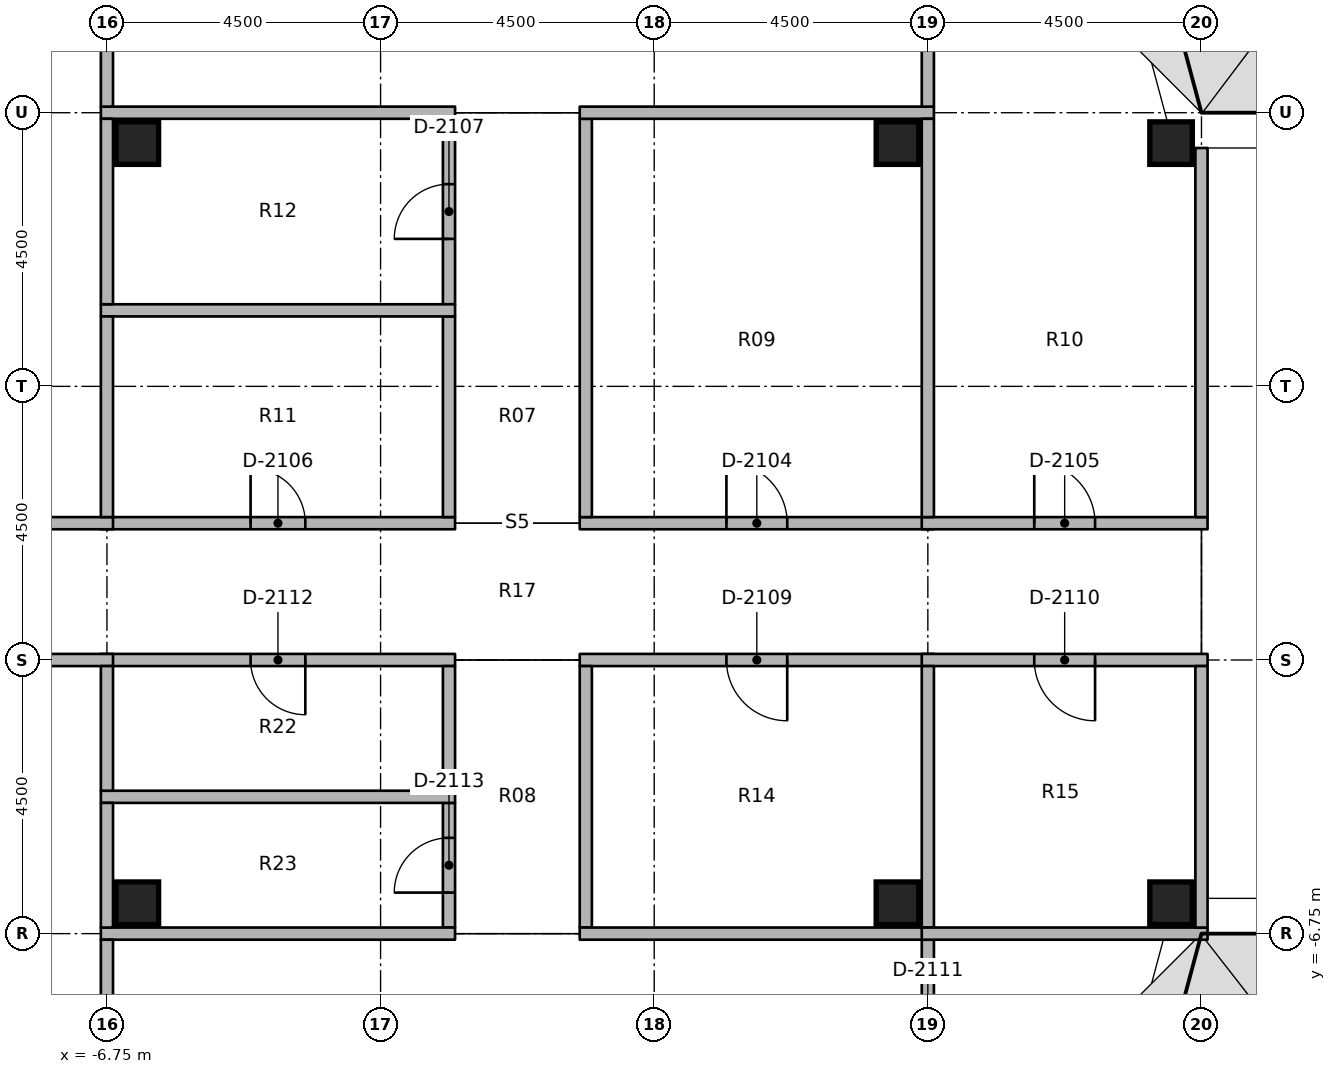
"""IFC4 building model, lengths in metres.
Left out: names, types, materials, properties, quantities, classifications, styles, units other than length and angle.
Written with IfcOpenShell. Run it as: python <this file> out.ifc"""

import sys

from ifc_helpers import new_model, si_unit, direction, frame, frame_2d, origin, origin_2d, place, context, subcontext, project, spatial, rectangle, extrude, element, fill, save


model = new_model("IFC4")
c1 = context("Model", 3, precision=1e-05, world=origin(), true_north=direction((0.0, 1.0)))
c2 = subcontext(c1, "Body", "Model", "MODEL_VIEW")
j1 = project(units=[si_unit("LENGTHUNIT", "METRE"), si_unit("PLANEANGLEUNIT", "RADIAN")], contexts=[c1])
p1 = place(None, origin())
s1 = spatial("IfcSite", under=j1, at=p1, CompositionType="ELEMENT")
p2 = place(p1, origin())
s2 = spatial("IfcBuilding", under=s1, at=p2, CompositionType="ELEMENT")
p3 = place(p2, frame((0.0, 0.0, 195.4)))
s3 = spatial("IfcBuildingStorey", under=s2, at=p3, CompositionType="ELEMENT", Elevation=195.4)
for number, where, z_axis, x_axis in (
    (1, (-6.25, -6.25, 0.0), (0.0, 0.0, 1.0), (1.0, 0.0, 0.0)),
    (2, (-6.25, 6.25, 0.0), (0.0, 0.0, 1.0), (1.0, 0.0, 0.0)),
    (3, (6.25, -6.25, 0.0), (0.0, 0.0, 1.0), (1.0, 0.0, 0.0)),
    (4, (6.25, 6.25, 0.0), (0.0, 0.0, 1.0), (1.0, 0.0, 0.0)),
    (5, (10.75, -6.25, 0.0), (0.0, 0.0, 1.0), (1.0, 0.0, 0.0)),
    (6, (10.75, 6.25, 0.0), (0.0, 0.0, 1.0), (1.0, 0.0, 0.0)),
):
    element("IfcColumn", number, at=place(p3, frame(where, z_axis=z_axis, x_axis=x_axis)), inside=s3, PredefinedType="COLUMN", context=c2, shape_type="SweptSolid", body=[
        extrude(rectangle(XDim=0.7, YDim=0.7, at=origin_2d()), origin(), (0.0, 0.0, 1.0), 3.65),
    ])
p4 = place(p3, frame((1.025, 0.0, 0.0), z_axis=(0.0, 0.0, 1.0), x_axis=(1.0, 0.0, 0.0)))
e7 = element("IfcWall", 7, at=p4, inside=s3, PredefinedType="PARTITIONING", context=c2, shape_type="SweptSolid", body=[
    extrude(rectangle(XDim=5.825, YDim=0.2, at=frame_2d((2.913, 0.0))), origin(), (0.0, 0.0, 1.0), 2.75),
])
p5 = place(p4, frame((2.413, 0.0, 0.0)))
e8 = element("IfcOpeningElement", 8, at=p5, cuts=e7, PredefinedType="OPENING", context=c2, shape_type="SweptSolid", body=[
    extrude(rectangle(XDim=1.0, YDim=2.1, at=frame_2d((0.5, 1.05))), frame((0.0, 0.11, 0.0), z_axis=(0.0, -1.0, 0.0), x_axis=(1.0, 0.0, 0.0)), (0.0, 0.0, 1.0), 0.22),
])
p6 = place(p3, frame((6.65, 0.0, 0.0), z_axis=(0.0, 0.0, 1.0), x_axis=(1.0, 0.0, 0.0)))
e9 = element("IfcWall", 9, at=p6, inside=s3, PredefinedType="PARTITIONING", context=c2, shape_type="SweptSolid", body=[
    extrude(rectangle(XDim=4.7, YDim=0.2, at=frame_2d((2.35, 0.0))), origin(), (0.0, 0.0, 1.0), 2.75),
])
p7 = place(p6, frame((1.85, 0.0, 0.0)))
e10 = element("IfcOpeningElement", 10, at=p7, cuts=e9, PredefinedType="OPENING", context=c2, shape_type="SweptSolid", body=[
    extrude(rectangle(XDim=1.0, YDim=2.1, at=frame_2d((0.5, 1.05))), frame((0.0, 0.11, 0.0), z_axis=(0.0, -1.0, 0.0), x_axis=(1.0, 0.0, 0.0)), (0.0, 0.0, 1.0), 0.22),
])
p8 = place(p3, frame((-6.85, 0.0, 0.0), z_axis=(0.0, 0.0, 1.0), x_axis=(1.0, 0.0, 0.0)))
e11 = element("IfcWall", 11, at=p8, inside=s3, PredefinedType="PARTITIONING", context=c2, shape_type="SweptSolid", body=[
    extrude(rectangle(XDim=5.825, YDim=0.2, at=frame_2d((2.913, 0.0))), origin(), (0.0, 0.0, 1.0), 2.75),
])
p9 = place(p8, frame((2.462, 0.0, 0.0)))
e12 = element("IfcOpeningElement", 12, at=p9, cuts=e11, PredefinedType="OPENING", context=c2, shape_type="SweptSolid", body=[
    extrude(rectangle(XDim=0.9, YDim=2.1, at=frame_2d((0.45, 1.05))), frame((0.0, 0.11, 0.0), z_axis=(0.0, -1.0, 0.0), x_axis=(1.0, 0.0, 0.0)), (0.0, 0.0, 1.0), 0.22),
])
p10 = place(p3, frame((-11.35, 0.0, 0.0), z_axis=(0.0, 0.0, 1.0), x_axis=(1.0, 0.0, 0.0)))
e13 = element("IfcWall", 13, at=p10, inside=s3, PredefinedType="PARTITIONING", context=c2, shape_type="SweptSolid", body=[
    extrude(rectangle(XDim=4.7, YDim=0.2, at=frame_2d((2.35, 0.0))), origin(), (0.0, 0.0, 1.0), 2.75),
])
p11 = place(p10, frame((1.85, 0.0, 0.0)))
e14 = element("IfcOpeningElement", 14, at=p11, cuts=e13, PredefinedType="OPENING", context=c2, shape_type="SweptSolid", body=[
    extrude(rectangle(XDim=1.0, YDim=2.1, at=frame_2d((0.5, 1.05))), frame((0.0, 0.11, 0.0), z_axis=(0.0, -1.0, 0.0), x_axis=(1.0, 0.0, 0.0)), (0.0, 0.0, 1.0), 0.22),
])
p12 = place(p3, frame((6.85, -2.25, 0.0), z_axis=(0.0, 0.0, 1.0), x_axis=(-1.0, 0.0, 0.0)))
e15 = element("IfcWall", 15, at=p12, inside=s3, PredefinedType="PARTITIONING", context=c2, shape_type="SweptSolid", body=[
    extrude(rectangle(XDim=5.825, YDim=0.2, at=frame_2d((2.913, 0.0))), origin(), (0.0, 0.0, 1.0), 2.75),
])
p13 = place(p12, frame((2.413, 0.0, 0.0)))
e16 = element("IfcOpeningElement", 16, at=p13, cuts=e15, PredefinedType="OPENING", context=c2, shape_type="SweptSolid", body=[
    extrude(rectangle(XDim=1.0, YDim=2.1, at=frame_2d((0.5, 1.05))), frame((0.0, 0.11, 0.0), z_axis=(0.0, -1.0, 0.0), x_axis=(1.0, 0.0, 0.0)), (0.0, 0.0, 1.0), 0.22),
])
p14 = place(p3, frame((11.35, -2.25, 0.0), z_axis=(0.0, 0.0, 1.0), x_axis=(-1.0, 0.0, 0.0)))
e17 = element("IfcWall", 17, at=p14, inside=s3, PredefinedType="PARTITIONING", context=c2, shape_type="SweptSolid", body=[
    extrude(rectangle(XDim=4.7, YDim=0.2, at=frame_2d((2.35, 0.0))), origin(), (0.0, 0.0, 1.0), 2.75),
])
p15 = place(p14, frame((1.85, 0.0, 0.0)))
e18 = element("IfcOpeningElement", 18, at=p15, cuts=e17, PredefinedType="OPENING", context=c2, shape_type="SweptSolid", body=[
    extrude(rectangle(XDim=1.0, YDim=2.1, at=frame_2d((0.5, 1.05))), frame((0.0, 0.11, 0.0), z_axis=(0.0, -1.0, 0.0), x_axis=(1.0, 0.0, 0.0)), (0.0, 0.0, 1.0), 0.22),
])
p16 = place(p3, frame((-1.025, -2.25, 0.0), z_axis=(0.0, 0.0, 1.0), x_axis=(-1.0, 0.0, 0.0)))
e19 = element("IfcWall", 19, at=p16, inside=s3, PredefinedType="PARTITIONING", context=c2, shape_type="SweptSolid", body=[
    extrude(rectangle(XDim=5.825, YDim=0.2, at=frame_2d((2.913, 0.0))), origin(), (0.0, 0.0, 1.0), 2.75),
])
p17 = place(p16, frame((2.462, 0.0, 0.0)))
e20 = element("IfcOpeningElement", 20, at=p17, cuts=e19, PredefinedType="OPENING", context=c2, shape_type="SweptSolid", body=[
    extrude(rectangle(XDim=0.9, YDim=2.1, at=frame_2d((0.45, 1.05))), frame((0.0, 0.11, 0.0), z_axis=(0.0, -1.0, 0.0), x_axis=(1.0, 0.0, 0.0)), (0.0, 0.0, 1.0), 0.22),
])
p18 = place(p3, frame((-6.65, -2.25, 0.0), z_axis=(0.0, 0.0, 1.0), x_axis=(-1.0, 0.0, 0.0)))
e21 = element("IfcWall", 21, at=p18, inside=s3, PredefinedType="PARTITIONING", context=c2, shape_type="SweptSolid", body=[
    extrude(rectangle(XDim=4.7, YDim=0.2, at=frame_2d((2.35, 0.0))), origin(), (0.0, 0.0, 1.0), 2.75),
])
p19 = place(p18, frame((1.85, 0.0, 0.0)))
e22 = element("IfcOpeningElement", 22, at=p19, cuts=e21, PredefinedType="OPENING", context=c2, shape_type="SweptSolid", body=[
    extrude(rectangle(XDim=1.0, YDim=2.1, at=frame_2d((0.5, 1.05))), frame((0.0, 0.11, 0.0), z_axis=(0.0, -1.0, 0.0), x_axis=(1.0, 0.0, 0.0)), (0.0, 0.0, 1.0), 0.22),
])
p20 = place(p3, frame((1.125, 0.1, 0.0), z_axis=(0.0, 0.0, 1.0), x_axis=(0.0, 1.0, 0.0)))
e23 = element("IfcWall", 23, at=p20, inside=s3, PredefinedType="PARTITIONING", context=c2, shape_type="SweptSolid", body=[
    extrude(rectangle(XDim=6.55, YDim=0.2, at=frame_2d((3.275, 0.0))), origin(), (0.0, 0.0, 1.0), 2.75),
])
p21 = place(p3, frame((-1.125, 0.1, 0.0), z_axis=(0.0, 0.0, 1.0), x_axis=(0.0, 1.0, 0.0)))
e24 = element("IfcWall", 24, at=p21, inside=s3, PredefinedType="PARTITIONING", context=c2, shape_type="SweptSolid", body=[
    extrude(rectangle(XDim=3.3, YDim=0.2, at=frame_2d((1.65, 0.0))), origin(), (0.0, 0.0, 1.0), 2.75),
])
p22 = place(p3, frame((-1.125, 3.6, 0.0), z_axis=(0.0, 0.0, 1.0), x_axis=(0.0, 1.0, 0.0)))
e25 = element("IfcWall", 25, at=p22, inside=s3, PredefinedType="PARTITIONING", context=c2, shape_type="SweptSolid", body=[
    extrude(rectangle(XDim=3.05, YDim=0.2, at=frame_2d((1.525, 0.0))), origin(), (0.0, 0.0, 1.0), 2.75),
])
p23 = place(p22, frame((1.075, 0.0, 0.0)))
e26 = element("IfcOpeningElement", 26, at=p23, cuts=e25, PredefinedType="OPENING", context=c2, shape_type="SweptSolid", body=[
    extrude(rectangle(XDim=0.9, YDim=2.1, at=frame_2d((0.45, 1.05))), frame((0.0, 0.11, 0.0), z_axis=(0.0, -1.0, 0.0), x_axis=(1.0, 0.0, 0.0)), (0.0, 0.0, 1.0), 0.22),
])
p24 = place(p3, frame((1.125, -6.65, 0.0), z_axis=(0.0, 0.0, 1.0), x_axis=(0.0, 1.0, 0.0)))
e27 = element("IfcWall", 27, at=p24, inside=s3, PredefinedType="PARTITIONING", context=c2, shape_type="SweptSolid", body=[
    extrude(rectangle(XDim=4.3, YDim=0.2, at=frame_2d((2.15, 0.0))), origin(), (0.0, 0.0, 1.0), 2.75),
])
p25 = place(p3, frame((-1.125, -4.4, 0.0), z_axis=(0.0, 0.0, 1.0), x_axis=(0.0, 1.0, 0.0)))
e28 = element("IfcWall", 28, at=p25, inside=s3, PredefinedType="PARTITIONING", context=c2, shape_type="SweptSolid", body=[
    extrude(rectangle(XDim=2.05, YDim=0.2, at=frame_2d((1.025, 0.0))), origin(), (0.0, 0.0, 1.0), 2.75),
])
p26 = place(p3, frame((-1.125, -6.65, 0.0), z_axis=(0.0, 0.0, 1.0), x_axis=(0.0, 1.0, 0.0)))
e29 = element("IfcWall", 29, at=p26, inside=s3, PredefinedType="PARTITIONING", context=c2, shape_type="SweptSolid", body=[
    extrude(rectangle(XDim=2.05, YDim=0.2, at=frame_2d((1.025, 0.0))), origin(), (0.0, 0.0, 1.0), 2.75),
])
p27 = place(p26, frame((0.575, 0.0, 0.0)))
e30 = element("IfcOpeningElement", 30, at=p27, cuts=e29, PredefinedType="OPENING", context=c2, shape_type="SweptSolid", body=[
    extrude(rectangle(XDim=0.9, YDim=2.1, at=frame_2d((0.45, 1.05))), frame((0.0, 0.11, 0.0), z_axis=(0.0, -1.0, 0.0), x_axis=(1.0, 0.0, 0.0)), (0.0, 0.0, 1.0), 0.22),
])
p28 = place(p3, frame((1.025, 6.75, 0.0), z_axis=(0.0, 0.0, 1.0), x_axis=(1.0, 0.0, 0.0)))
e31 = element("IfcWall", 31, at=p28, inside=s3, PredefinedType="PARTITIONING", context=c2, shape_type="SweptSolid", body=[
    extrude(rectangle(XDim=5.825, YDim=0.2, at=frame_2d((2.913, 0.0))), origin(), (0.0, 0.0, 1.0), 2.75),
])
p29 = place(p3, frame((6.75, 6.85, 0.0), z_axis=(0.0, 0.0, 1.0), x_axis=(0.0, 1.0, 0.0)))
e32 = element("IfcWall", 32, at=p29, inside=s3, PredefinedType="PARTITIONING", context=c2, shape_type="SweptSolid", body=[
    extrude(rectangle(XDim=3.78, YDim=0.2, at=frame_2d((1.89, 0.0))), origin(), (0.0, 0.0, 1.0), 2.75),
])
p30 = place(p3, frame((-6.85, 6.75, 0.0), z_axis=(0.0, 0.0, 1.0), x_axis=(1.0, 0.0, 0.0)))
e33 = element("IfcWall", 33, at=p30, inside=s3, PredefinedType="PARTITIONING", context=c2, shape_type="SweptSolid", body=[
    extrude(rectangle(XDim=5.825, YDim=0.2, at=frame_2d((2.913, 0.0))), origin(), (0.0, 0.0, 1.0), 2.75),
])
p31 = place(p3, frame((-6.75, 6.85, 0.0), z_axis=(0.0, 0.0, 1.0), x_axis=(0.0, 1.0, 0.0)))
e34 = element("IfcWall", 34, at=p31, inside=s3, PredefinedType="PARTITIONING", context=c2, shape_type="SweptSolid", body=[
    extrude(rectangle(XDim=3.78, YDim=0.2, at=frame_2d((1.89, 0.0))), origin(), (0.0, 0.0, 1.0), 2.75),
])
p32 = place(p3, frame((1.025, -6.75, 0.0), z_axis=(0.0, 0.0, 1.0), x_axis=(1.0, 0.0, 0.0)))
e35 = element("IfcWall", 35, at=p32, inside=s3, PredefinedType="PARTITIONING", context=c2, shape_type="SweptSolid", body=[
    extrude(rectangle(XDim=5.825, YDim=0.2, at=frame_2d((2.913, 0.0))), origin(), (0.0, 0.0, 1.0), 2.75),
])
p33 = place(p3, frame((6.75, -6.85, 0.0), z_axis=(0.0, 0.0, 1.0), x_axis=(0.0, -1.0, 0.0)))
e36 = element("IfcWall", 36, at=p33, inside=s3, PredefinedType="PARTITIONING", context=c2, shape_type="SweptSolid", body=[
    extrude(rectangle(XDim=3.78, YDim=0.2, at=frame_2d((1.89, 0.0))), origin(), (0.0, 0.0, 1.0), 2.75),
])
p34 = place(p33, frame((1.44, 0.0, 0.0)))
e37 = element("IfcOpeningElement", 37, at=p34, cuts=e36, PredefinedType="OPENING", context=c2, shape_type="SweptSolid", body=[
    extrude(rectangle(XDim=0.9, YDim=2.1, at=frame_2d((0.45, 1.05))), frame((0.0, 0.11, 0.0), z_axis=(0.0, -1.0, 0.0), x_axis=(1.0, 0.0, 0.0)), (0.0, 0.0, 1.0), 0.22),
])
p35 = place(p3, frame((-6.85, -6.75, 0.0), z_axis=(0.0, 0.0, 1.0), x_axis=(1.0, 0.0, 0.0)))
e38 = element("IfcWall", 38, at=p35, inside=s3, PredefinedType="PARTITIONING", context=c2, shape_type="SweptSolid", body=[
    extrude(rectangle(XDim=5.825, YDim=0.2, at=frame_2d((2.913, 0.0))), origin(), (0.0, 0.0, 1.0), 2.75),
])
p36 = place(p3, frame((-6.75, -10.63, 0.0), z_axis=(0.0, 0.0, 1.0), x_axis=(0.0, 1.0, 0.0)))
e39 = element("IfcWall", 39, at=p36, inside=s3, PredefinedType="PARTITIONING", context=c2, shape_type="SweptSolid", body=[
    extrude(rectangle(XDim=3.78, YDim=0.2, at=frame_2d((1.89, 0.0))), origin(), (0.0, 0.0, 1.0), 2.75),
])
p37 = place(p3, frame((6.75, 0.1, 0.0), z_axis=(0.0, 0.0, 1.0), x_axis=(0.0, 1.0, 0.0)))
e40 = element("IfcWall", 40, at=p37, inside=s3, PredefinedType="PARTITIONING", context=c2, shape_type="SweptSolid", body=[
    extrude(rectangle(XDim=6.55, YDim=0.2, at=frame_2d((3.275, 0.0))), origin(), (0.0, 0.0, 1.0), 2.75),
])
p38 = place(p3, frame((11.25, 0.1, 0.0), z_axis=(0.0, 0.0, 1.0), x_axis=(0.0, 1.0, 0.0)))
e41 = element("IfcWall", 41, at=p38, inside=s3, PredefinedType="PARTITIONING", context=c2, shape_type="SweptSolid", body=[
    extrude(rectangle(XDim=6.07, YDim=0.2, at=frame_2d((3.035, 0.0))), origin(), (0.0, 0.0, 1.0), 2.75),
])
p39 = place(p3, frame((-6.85, 3.5, 0.0), z_axis=(0.0, 0.0, 1.0), x_axis=(1.0, 0.0, 0.0)))
e42 = element("IfcWall", 42, at=p39, inside=s3, PredefinedType="PARTITIONING", context=c2, shape_type="SweptSolid", body=[
    extrude(rectangle(XDim=5.825, YDim=0.2, at=frame_2d((2.913, 0.0))), origin(), (0.0, 0.0, 1.0), 2.75),
])
p40 = place(p3, frame((-6.75, 0.1, 0.0), z_axis=(0.0, 0.0, 1.0), x_axis=(0.0, 1.0, 0.0)))
e43 = element("IfcWall", 43, at=p40, inside=s3, PredefinedType="PARTITIONING", context=c2, shape_type="SweptSolid", body=[
    extrude(rectangle(XDim=3.3, YDim=0.2, at=frame_2d((1.65, 0.0))), origin(), (0.0, 0.0, 1.0), 2.75),
])
p41 = place(p3, frame((-6.75, 3.6, 0.0), z_axis=(0.0, 0.0, 1.0), x_axis=(0.0, 1.0, 0.0)))
e44 = element("IfcWall", 44, at=p41, inside=s3, PredefinedType="PARTITIONING", context=c2, shape_type="SweptSolid", body=[
    extrude(rectangle(XDim=3.05, YDim=0.2, at=frame_2d((1.525, 0.0))), origin(), (0.0, 0.0, 1.0), 2.75),
])
p42 = place(p3, frame((6.75, -6.65, 0.0), z_axis=(0.0, 0.0, 1.0), x_axis=(0.0, 1.0, 0.0)))
e45 = element("IfcWall", 45, at=p42, inside=s3, PredefinedType="PARTITIONING", context=c2, shape_type="SweptSolid", body=[
    extrude(rectangle(XDim=4.3, YDim=0.2, at=frame_2d((2.15, 0.0))), origin(), (0.0, 0.0, 1.0), 2.75),
])
p43 = place(p3, frame((6.65, -6.75, 0.0), z_axis=(0.0, 0.0, 1.0), x_axis=(1.0, 0.0, 0.0)))
e46 = element("IfcWall", 46, at=p43, inside=s3, PredefinedType="PARTITIONING", context=c2, shape_type="SweptSolid", body=[
    extrude(rectangle(XDim=4.7, YDim=0.2, at=frame_2d((2.35, 0.0))), origin(), (0.0, 0.0, 1.0), 2.75),
])
p44 = place(p3, frame((11.25, -6.65, 0.0), z_axis=(0.0, 0.0, 1.0), x_axis=(0.0, 1.0, 0.0)))
e47 = element("IfcWall", 47, at=p44, inside=s3, PredefinedType="PARTITIONING", context=c2, shape_type="SweptSolid", body=[
    extrude(rectangle(XDim=4.3, YDim=0.2, at=frame_2d((2.15, 0.0))), origin(), (0.0, 0.0, 1.0), 2.75),
])
p45 = place(p3, frame((-6.85, -4.5, 0.0), z_axis=(0.0, 0.0, 1.0), x_axis=(1.0, 0.0, 0.0)))
e48 = element("IfcWall", 48, at=p45, inside=s3, PredefinedType="PARTITIONING", context=c2, shape_type="SweptSolid", body=[
    extrude(rectangle(XDim=5.825, YDim=0.2, at=frame_2d((2.913, 0.0))), origin(), (0.0, 0.0, 1.0), 2.75),
])
for number, where, z_axis, x_axis in (
    (49, (-6.75, -4.4, 0.0), (0.0, 0.0, 1.0), (0.0, 1.0, 0.0)),
    (50, (-6.75, -6.65, 0.0), (0.0, 0.0, 1.0), (0.0, 1.0, 0.0)),
):
    element("IfcWall", number, at=place(p3, frame(where, z_axis=z_axis, x_axis=x_axis)), inside=s3, PredefinedType="PARTITIONING", context=c2, shape_type="SweptSolid", body=[
        extrude(rectangle(XDim=2.05, YDim=0.2, at=frame_2d((1.025, 0.0))), origin(), (0.0, 0.0, 1.0), 2.75),
    ])
p46 = place(p5, origin())
e51 = element("IfcDoor", 51, at=p46, inside=s3, OperationType="SINGLE_SWING_RIGHT", PredefinedType="DOOR", context=c2, shape_type="SweptSolid", body=[
    extrude(rectangle(XDim=1.0, YDim=2.1, at=frame_2d((0.5, 1.05))), frame((0.0, 0.025, 0.0), z_axis=(0.0, -1.0, 0.0), x_axis=(1.0, 0.0, 0.0)), (0.0, 0.0, 1.0), 0.05),
])
fill(e8, e51)
p47 = place(p7, origin())
e52 = element("IfcDoor", 52, at=p47, inside=s3, OperationType="SINGLE_SWING_RIGHT", PredefinedType="DOOR", context=c2, shape_type="SweptSolid", body=[
    extrude(rectangle(XDim=1.0, YDim=2.1, at=frame_2d((0.5, 1.05))), frame((0.0, 0.025, 0.0), z_axis=(0.0, -1.0, 0.0), x_axis=(1.0, 0.0, 0.0)), (0.0, 0.0, 1.0), 0.05),
])
fill(e10, e52)
p48 = place(p9, origin())
e53 = element("IfcDoor", 53, at=p48, inside=s3, OperationType="SINGLE_SWING_RIGHT", PredefinedType="DOOR", context=c2, shape_type="SweptSolid", body=[
    extrude(rectangle(XDim=0.9, YDim=2.1, at=frame_2d((0.45, 1.05))), frame((0.0, 0.025, 0.0), z_axis=(0.0, -1.0, 0.0), x_axis=(1.0, 0.0, 0.0)), (0.0, 0.0, 1.0), 0.05),
])
fill(e12, e53)
p49 = place(p23, origin())
e54 = element("IfcDoor", 54, at=p49, inside=s3, OperationType="SINGLE_SWING_LEFT", PredefinedType="DOOR", context=c2, shape_type="SweptSolid", body=[
    extrude(rectangle(XDim=0.9, YDim=2.1, at=frame_2d((0.45, 1.05))), frame((0.0, 0.025, 0.0), z_axis=(0.0, -1.0, 0.0), x_axis=(1.0, 0.0, 0.0)), (0.0, 0.0, 1.0), 0.05),
])
fill(e26, e54)
p50 = place(p13, origin())
e55 = element("IfcDoor", 55, at=p50, inside=s3, OperationType="SINGLE_SWING_RIGHT", PredefinedType="DOOR", context=c2, shape_type="SweptSolid", body=[
    extrude(rectangle(XDim=1.0, YDim=2.1, at=frame_2d((0.5, 1.05))), frame((0.0, 0.025, 0.0), z_axis=(0.0, -1.0, 0.0), x_axis=(1.0, 0.0, 0.0)), (0.0, 0.0, 1.0), 0.05),
])
fill(e16, e55)
p51 = place(p15, origin())
e56 = element("IfcDoor", 56, at=p51, inside=s3, OperationType="SINGLE_SWING_RIGHT", PredefinedType="DOOR", context=c2, shape_type="SweptSolid", body=[
    extrude(rectangle(XDim=1.0, YDim=2.1, at=frame_2d((0.5, 1.05))), frame((0.0, 0.025, 0.0), z_axis=(0.0, -1.0, 0.0), x_axis=(1.0, 0.0, 0.0)), (0.0, 0.0, 1.0), 0.05),
])
fill(e18, e56)
p52 = place(p17, origin())
e57 = element("IfcDoor", 57, at=p52, inside=s3, OperationType="SINGLE_SWING_RIGHT", PredefinedType="DOOR", context=c2, shape_type="SweptSolid", body=[
    extrude(rectangle(XDim=0.9, YDim=2.1, at=frame_2d((0.45, 1.05))), frame((0.0, 0.025, 0.0), z_axis=(0.0, -1.0, 0.0), x_axis=(1.0, 0.0, 0.0)), (0.0, 0.0, 1.0), 0.05),
])
fill(e20, e57)
p53 = place(p27, origin())
e58 = element("IfcDoor", 58, at=p53, inside=s3, OperationType="SINGLE_SWING_RIGHT", PredefinedType="DOOR", context=c2, shape_type="SweptSolid", body=[
    extrude(rectangle(XDim=0.9, YDim=2.1, at=frame_2d((0.45, 1.05))), frame((0.0, 0.025, 0.0), z_axis=(0.0, -1.0, 0.0), x_axis=(1.0, 0.0, 0.0)), (0.0, 0.0, 1.0), 0.05),
])
fill(e30, e58)
save(model, sys.argv[1])
